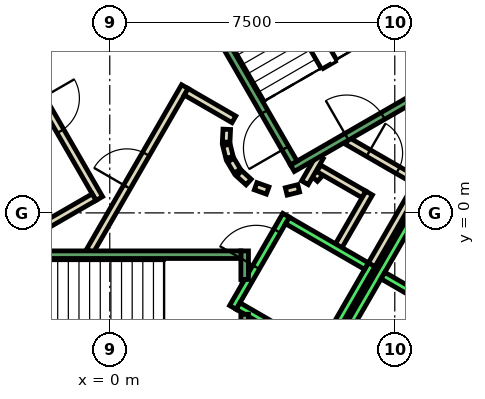
"""IFC4 building model, lengths in metres.
Left out: names, types, materials, properties, quantities, classifications, styles, units other than length and angle.
Written with IfcOpenShell. Run it as: python <this file> out.ifc"""

import sys

from ifc_helpers import new_model, si_unit, direction, frame, frame_2d, origin, place, context, subcontext, project, spatial, rectangle, extrude, element, fill, save


model = new_model("IFC4")
c1 = context("Model", 3, precision=1e-05, world=origin(), true_north=direction((0.0, 1.0)))
c2 = subcontext(c1, "Body", "Model", "MODEL_VIEW")
j1 = project(units=[si_unit("LENGTHUNIT", "METRE"), si_unit("PLANEANGLEUNIT", "RADIAN")], contexts=[c1])
p1 = place(None, origin())
s1 = spatial("IfcSite", under=j1, at=p1, CompositionType="ELEMENT")
p2 = place(p1, origin())
s2 = spatial("IfcBuilding", under=s1, at=p2, CompositionType="ELEMENT")
p3 = place(p2, frame((0.0, 0.0, 171.8)))
s3 = spatial("IfcBuildingStorey", under=s2, at=p3, CompositionType="ELEMENT", Elevation=171.8)
p4 = place(p3, frame((5.39, 0.898, 0.0), z_axis=(0.0, 0.0, 1.0), x_axis=(0.673828488714, 0.738887791073, 0.0)))
e1 = element("IfcWall", 1, at=p4, inside=s3, PredefinedType="PARTITIONING", context=c2, shape_type="SweptSolid", body=[
    extrude(rectangle(XDim=0.263, YDim=0.2, at=frame_2d((0.131, 0.0))), origin(), (0.0, 0.0, 1.0), 3.8),
])
p5 = place(p3, frame((5.499, 1.172, 0.0), z_axis=(0.0, 0.0, 1.0), x_axis=(0.866333505267, -0.499465972466, 0.0)))
e2 = element("IfcWall", 2, at=p5, inside=s3, PredefinedType="PARTITIONING", context=c2, shape_type="SweptSolid", body=[
    extrude(rectangle(XDim=1.374, YDim=0.2, at=frame_2d((0.687, 0.0))), origin(), (0.0, 0.0, 1.0), 3.8),
])
p6 = place(p3, frame((6.826, 0.522, 0.0), z_axis=(0.0, 0.0, 1.0), x_axis=(-0.500016722714, -0.866015748706, 0.0)))
e3 = element("IfcWall", 3, at=p6, inside=s3, PredefinedType="PARTITIONING", context=c2, shape_type="SweptSolid", body=[
    extrude(rectangle(XDim=1.7, YDim=0.2, at=frame_2d((0.85, 0.0))), origin(), (0.0, 0.0, 1.0), 3.8),
])
p7 = place(p3, frame((6.25, 1.894, 0.0), z_axis=(0.0, 0.0, 1.0), x_axis=(0.866043184279, -0.499969202016, 0.0)))
e4 = element("IfcWall", 4, at=p7, inside=s3, PredefinedType="PARTITIONING", context=c2, shape_type="SweptSolid", body=[
    extrude(rectangle(XDim=2.084, YDim=0.2, at=frame_2d((1.042, 0.0))), origin(), (0.0, 0.0, 1.0), 3.8),
])
p8 = place(p7, frame((0.642, 0.0, 0.0)))
e5 = element("IfcOpeningElement", 5, at=p8, cuts=e4, PredefinedType="OPENING", context=c2, shape_type="SweptSolid", body=[
    extrude(rectangle(XDim=0.9, YDim=2.1, at=frame_2d((0.45, 1.05))), frame((0.0, 0.11, 0.0), z_axis=(0.0, -1.0, 0.0), x_axis=(1.0, 0.0, 0.0)), (0.0, 0.0, 1.0), 0.22),
])
p9 = place(p3, frame((8.192, 0.888, 0.0), z_axis=(0.0, 0.0, 1.0), x_axis=(-0.499940625693, -0.866059680843, 0.0)))
e6 = element("IfcWall", 6, at=p9, inside=s3, PredefinedType="PARTITIONING", context=c2, shape_type="SweptSolid", body=[
    extrude(rectangle(XDim=2.68, YDim=0.2, at=frame_2d((1.34, 0.0))), origin(), (0.0, 0.0, 1.0), 3.8),
])
p10 = place(p3, frame((5.135, 0.793, 0.0), z_axis=(0.0, 0.0, 1.0), x_axis=(0.499526442893, 0.866298639529, 0.0)))
e7 = element("IfcWall", 7, at=p10, inside=s3, PredefinedType="PARTITIONING", context=c2, shape_type="SweptSolid", body=[
    extrude(rectangle(XDim=0.791, YDim=0.2, at=frame_2d((0.396, 0.0))), origin(), (0.0, 0.0, 1.0), 3.8),
])
p11 = place(p3, frame((-0.52, -1.0, 0.0), z_axis=(0.0, 0.0, 1.0), x_axis=(0.50011622646, 0.865958290007, 0.0)))
e8 = element("IfcWall", 8, at=p11, inside=s3, PredefinedType="PARTITIONING", context=c2, shape_type="SweptSolid", body=[
    extrude(rectangle(XDim=4.991, YDim=0.2, at=frame_2d((2.496, 0.0))), origin(), (0.0, 0.0, 1.0), 3.8),
])
p12 = place(p11, frame((1.945, 0.0, 0.0)))
e9 = element("IfcOpeningElement", 9, at=p12, cuts=e8, PredefinedType="OPENING", context=c2, shape_type="SweptSolid", body=[
    extrude(rectangle(XDim=1.0, YDim=2.1, at=frame_2d((0.5, 1.05))), frame((0.0, 0.11, 0.0), z_axis=(0.0, -1.0, 0.0), x_axis=(1.0, 0.0, 0.0)), (0.0, 0.0, 1.0), 0.22),
])
p13 = place(p3, frame((2.012, 3.186, 0.0), z_axis=(0.0, 0.0, 1.0), x_axis=(0.865891012941, -0.500232699559, 0.0)))
e10 = element("IfcWall", 10, at=p13, inside=s3, PredefinedType="PARTITIONING", context=c2, shape_type="SweptSolid", body=[
    extrude(rectangle(XDim=1.449, YDim=0.2, at=frame_2d((0.725, 0.0))), origin(), (0.0, 0.0, 1.0), 3.8),
])
p14 = place(p3, frame((3.079, 2.199, 0.0), z_axis=(0.0, 0.0, 1.0), x_axis=(-0.047771483479, -0.998858290933, 0.0)))
e11 = element("IfcWall", 11, at=p14, inside=s3, PredefinedType="PARTITIONING", context=c2, shape_type="SweptSolid", body=[
    extrude(rectangle(XDim=0.337, YDim=0.2, at=frame_2d((0.169, 0.0))), origin(), (0.0, 0.0, 1.0), 3.8),
])
p15 = place(p3, frame((3.07, 1.786, 0.0), z_axis=(0.0, 0.0, 1.0), x_axis=(0.242705583207, -0.970099994784, 0.0)))
e12 = element("IfcWall", 12, at=p15, inside=s3, PredefinedType="PARTITIONING", context=c2, shape_type="SweptSolid", body=[
    extrude(rectangle(XDim=0.338, YDim=0.2, at=frame_2d((0.169, 0.0))), origin(), (0.0, 0.0, 1.0), 3.8),
])
for number, where, z_axis, x_axis in (
    (13, (3.182, 1.388, 0.0), (0.0, 0.0, 1.0), (0.512, -0.859, 0.0)),
    (14, (3.404, 1.039, 0.0), (0.0, 0.0, 1.0), (0.74, -0.672, 0.0)),
):
    element("IfcWall", number, at=place(p3, frame(where, z_axis=z_axis, x_axis=x_axis)), inside=s3, PredefinedType="PARTITIONING", context=c2, shape_type="SweptSolid", body=[
        extrude(rectangle(XDim=0.338, YDim=0.2, at=frame_2d((0.169, 0.0))), origin(), (0.0, 0.0, 1.0), 3.8),
    ])
p16 = place(p3, frame((3.838, 0.702, 0.0), z_axis=(0.0, 0.0, 1.0), x_axis=(0.941035081519, -0.338308993895, 0.0)))
e15 = element("IfcWall", 15, at=p16, inside=s3, PredefinedType="PARTITIONING", context=c2, shape_type="SweptSolid", body=[
    extrude(rectangle(XDim=0.337, YDim=0.2, at=frame_2d((0.168, 0.0))), origin(), (0.0, 0.0, 1.0), 3.8),
])
p17 = place(p3, frame((4.644, 0.564, 0.0), z_axis=(0.0, 0.0, 1.0), x_axis=(0.969929076366, 0.243387729394, 0.0)))
e16 = element("IfcWall", 16, at=p17, inside=s3, PredefinedType="PARTITIONING", context=c2, shape_type="SweptSolid", body=[
    extrude(rectangle(XDim=0.337, YDim=0.2, at=frame_2d((0.168, 0.0))), origin(), (0.0, 0.0, 1.0), 3.8),
])
p18 = place(p3, frame((-2.771, 4.7, 0.0), z_axis=(0.0, 0.0, 1.0), x_axis=(0.499969479948, -0.866043023828, 0.0)))
e17 = element("IfcWall", 17, at=p18, inside=s3, PredefinedType="PARTITIONING", context=c2, shape_type="SweptSolid", body=[
    extrude(rectangle(XDim=4.99, YDim=0.2, at=frame_2d((2.495, 0.0))), origin(), (0.0, 0.0, 1.0), 3.8),
])
p19 = place(p18, frame((1.945, 0.0, 0.0)))
e18 = element("IfcOpeningElement", 18, at=p19, cuts=e17, PredefinedType="OPENING", context=c2, shape_type="SweptSolid", body=[
    extrude(rectangle(XDim=1.0, YDim=2.1, at=frame_2d((0.5, 1.05))), frame((0.0, 0.11, 0.0), z_axis=(0.0, -1.0, 0.0), x_axis=(1.0, 0.0, 0.0)), (0.0, 0.0, 1.0), 0.22),
])
p20 = place(p3, frame((-0.412, 0.414, 0.0), z_axis=(0.0, 0.0, 1.0), x_axis=(-0.866017369001, -0.500013916395, 0.0)))
e19 = element("IfcWall", 19, at=p20, inside=s3, PredefinedType="PARTITIONING", context=c2, shape_type="SweptSolid", body=[
    extrude(rectangle(XDim=1.45, YDim=0.2, at=frame_2d((0.725, 0.0))), origin(), (0.0, 0.0, 1.0), 3.8),
])
p21 = place(p3, frame((3.24, -2.488, 0.0), z_axis=(0.0, 0.0, 1.0), x_axis=(0.49994636267, 0.866056369097, 0.0)))
e20 = element("IfcWall", 20, at=p21, inside=s3, PredefinedType="STANDARD", context=c2, shape_type="SweptSolid", body=[
    extrude(rectangle(XDim=2.8, YDim=0.2, at=frame_2d((1.4, 0.0))), origin(), (0.0, 0.0, 1.0), 3.8),
])
p22 = place(p21, frame((1.225, 0.0, 0.0)))
e21 = element("IfcOpeningElement", 21, at=p22, cuts=e20, PredefinedType="OPENING", context=c2, shape_type="SweptSolid", body=[
    extrude(rectangle(XDim=1.1, YDim=2.1, at=frame_2d((0.55, 1.05))), frame((0.0, 0.11, 0.0), z_axis=(0.0, -1.0, 0.0), x_axis=(1.0, 0.0, 0.0)), (0.0, 0.0, 1.0), 0.22),
])
p23 = place(p3, frame((5.492, -3.788, 0.0), z_axis=(0.0, 0.0, 1.0), x_axis=(0.500011755427, 0.866018616679, 0.0)))
e22 = element("IfcWall", 22, at=p23, inside=s3, PredefinedType="STANDARD", context=c2, shape_type="SweptSolid", body=[
    extrude(rectangle(XDim=2.8, YDim=0.2, at=frame_2d((1.4, 0.0))), origin(), (0.0, 0.0, 1.0), 3.8),
])
p24 = place(p3, frame((3.377, -2.452, 0.0), z_axis=(0.0, 0.0, 1.0), x_axis=(0.865955154139, -0.50012165622, 0.0)))
e23 = element("IfcWall", 23, at=p24, inside=s3, PredefinedType="STANDARD", context=c2, shape_type="SweptSolid", body=[
    extrude(rectangle(XDim=2.4, YDim=0.2, at=frame_2d((1.2, 0.0))), origin(), (0.0, 0.0, 1.0), 3.8),
])
p25 = place(p3, frame((4.677, -0.2, 0.0), z_axis=(0.0, 0.0, 1.0), x_axis=(0.865973769406, -0.500089422704, 0.0)))
e24 = element("IfcWall", 24, at=p25, inside=s3, PredefinedType="STANDARD", context=c2, shape_type="SweptSolid", body=[
    extrude(rectangle(XDim=2.399, YDim=0.2, at=frame_2d((1.2, 0.0))), origin(), (0.0, 0.0, 1.0), 3.8),
])
p26 = place(p3, frame((4.451, -6.19, 0.0), z_axis=(0.0, 0.0, 1.0), x_axis=(0.50000090737, 0.866024879913, 0.0)))
e25 = element("IfcWall", 25, at=p26, inside=s3, PredefinedType="STANDARD", context=c2, shape_type="SweptSolid", body=[
    extrude(rectangle(XDim=10.6, YDim=0.2, at=frame_2d((5.3, 0.0))), origin(), (0.0, 0.0, 1.0), 3.8),
])
p27 = place(p3, frame((7.188, -1.65, 0.0), z_axis=(0.0, 0.0, 1.0), x_axis=(0.866022959057, -0.500004234368, 0.0)))
e26 = element("IfcWall", 26, at=p27, inside=s3, PredefinedType="STANDARD", context=c2, shape_type="SweptSolid", body=[
    extrude(rectangle(XDim=2.5, YDim=0.2, at=frame_2d((1.25, 0.0))), origin(), (0.0, 0.0, 1.0), 3.8),
])
p28 = place(p3, frame((3.55, -2.667, 0.0), z_axis=(0.0, 0.0, 1.0), x_axis=(0.0, -1.0, 0.0)))
e27 = element("IfcWall", 27, at=p28, inside=s3, PredefinedType="STANDARD", context=c2, shape_type="SweptSolid", body=[
    extrude(rectangle(XDim=2.733, YDim=0.2, at=frame_2d((1.366, 0.0))), origin(), (0.0, 0.0, 1.0), 3.8),
])
p29 = place(p3, frame((3.55, -1.0, 0.0), z_axis=(0.0, 0.0, 1.0), x_axis=(0.0, -1.0, 0.0)))
e28 = element("IfcWall", 28, at=p29, inside=s3, PredefinedType="STANDARD", context=c2, shape_type="SweptSolid", body=[
    extrude(rectangle(XDim=0.751, YDim=0.2, at=frame_2d((0.375, 0.0))), origin(), (0.0, 0.0, 1.0), 3.8),
])
p30 = place(p3, frame((-3.45, -1.1, 0.0), z_axis=(0.0, 0.0, 1.0), x_axis=(1.0, 0.0, 0.0)))
e29 = element("IfcWall", 29, at=p30, inside=s3, PredefinedType="STANDARD", context=c2, shape_type="SweptSolid", body=[
    extrude(rectangle(XDim=6.9, YDim=0.2, at=frame_2d((3.45, 0.0))), origin(), (0.0, 0.0, 1.0), 3.8),
])
p31 = place(p30, frame((0.45, 0.0, 0.0)))
e30 = element("IfcOpeningElement", 30, at=p31, cuts=e29, PredefinedType="OPENING", context=c2, shape_type="SweptSolid", body=[
    extrude(rectangle(XDim=1.1, YDim=2.2, at=frame_2d((0.55, 1.1))), frame((0.0, 0.11, 0.0), z_axis=(0.0, -1.0, 0.0), x_axis=(1.0, 0.0, 0.0)), (0.0, 0.0, 1.0), 0.22),
])
p32 = place(p3, frame((4.806, 1.176, 0.0), z_axis=(0.0, 0.0, 1.0), x_axis=(0.866059941101, 0.499940174841, 0.0)))
e31 = element("IfcWall", 31, at=p32, inside=s3, PredefinedType="STANDARD", context=c2, shape_type="SweptSolid", body=[
    extrude(rectangle(XDim=4.4, YDim=0.2, at=frame_2d((2.2, 0.0))), origin(), (0.0, 0.0, 1.0), 3.8),
])
p33 = place(p32, frame((1.65, 0.0, 0.0)))
e32 = element("IfcOpeningElement", 32, at=p33, cuts=e31, PredefinedType="OPENING", context=c2, shape_type="SweptSolid", body=[
    extrude(rectangle(XDim=1.1, YDim=2.2, at=frame_2d((0.55, 1.1))), frame((0.0, 0.11, 0.0), z_axis=(0.0, -1.0, 0.0), x_axis=(1.0, 0.0, 0.0)), (0.0, 0.0, 1.0), 0.22),
])
p34 = place(p3, frame((4.843, 1.312, 0.0), z_axis=(0.0, 0.0, 1.0), x_axis=(-0.499963383562, 0.866046543262, 0.0)))
e33 = element("IfcWall", 33, at=p34, inside=s3, PredefinedType="STANDARD", context=c2, shape_type="SweptSolid", body=[
    extrude(rectangle(XDim=6.9, YDim=0.2, at=frame_2d((3.45, 0.0))), origin(), (0.0, 0.0, 1.0), 3.8),
])
p35 = place(p34, frame((0.45, 0.0, 0.0)))
e34 = element("IfcOpeningElement", 34, at=p35, cuts=e33, PredefinedType="OPENING", context=c2, shape_type="SweptSolid", body=[
    extrude(rectangle(XDim=1.1, YDim=2.2, at=frame_2d((0.55, 1.1))), frame((0.0, 0.11, 0.0), z_axis=(0.0, -1.0, 0.0), x_axis=(1.0, 0.0, 0.0)), (0.0, 0.0, 1.0), 0.22),
])
p36 = place(p3, frame((8.48, 3.412, 0.0), z_axis=(0.0, 0.0, 1.0), x_axis=(-0.499978703459, 0.866037698999, 0.0)))
e35 = element("IfcWall", 35, at=p36, inside=s3, PredefinedType="STANDARD", context=c2, shape_type="SweptSolid", body=[
    extrude(rectangle(XDim=6.9, YDim=0.2, at=frame_2d((3.45, 0.0))), origin(), (0.0, 0.0, 1.0), 3.8),
])
p37 = place(p3, frame((-1.393, 7.288, 0.0), z_axis=(0.0, 0.0, 1.0), x_axis=(-0.499963383562, -0.866046543262, 0.0)))
e36 = element("IfcWall", 36, at=p37, inside=s3, PredefinedType="STANDARD", context=c2, shape_type="SweptSolid", body=[
    extrude(rectangle(XDim=6.9, YDim=0.2, at=frame_2d((3.45, 0.0))), origin(), (0.0, 0.0, 1.0), 3.8),
])
p38 = place(p37, frame((0.45, 0.0, 0.0)))
e37 = element("IfcOpeningElement", 37, at=p38, cuts=e36, PredefinedType="OPENING", context=c2, shape_type="SweptSolid", body=[
    extrude(rectangle(XDim=1.1, YDim=2.2, at=frame_2d((0.55, 1.1))), frame((0.0, 0.11, 0.0), z_axis=(0.0, -1.0, 0.0), x_axis=(1.0, 0.0, 0.0)), (0.0, 0.0, 1.0), 0.22),
])
p39 = place(p12, origin())
e38 = element("IfcDoor", 38, at=p39, inside=s3, OperationType="SINGLE_SWING_LEFT", PredefinedType="DOOR", context=c2, shape_type="SweptSolid", body=[
    extrude(rectangle(XDim=1.0, YDim=2.1, at=frame_2d((0.5, 1.05))), frame((0.0, 0.025, 0.0), z_axis=(0.0, -1.0, 0.0), x_axis=(1.0, 0.0, 0.0)), (0.0, 0.0, 1.0), 0.05),
])
fill(e9, e38)
p40 = place(p19, origin())
e39 = element("IfcDoor", 39, at=p40, inside=s3, OperationType="SINGLE_SWING_RIGHT", PredefinedType="DOOR", context=c2, shape_type="SweptSolid", body=[
    extrude(rectangle(XDim=1.0, YDim=2.1, at=frame_2d((0.5, 1.05))), frame((0.0, 0.025, 0.0), z_axis=(0.0, -1.0, 0.0), x_axis=(1.0, 0.0, 0.0)), (0.0, 0.0, 1.0), 0.05),
])
fill(e18, e39)
p41 = place(p8, origin())
e40 = element("IfcDoor", 40, at=p41, inside=s3, OperationType="SINGLE_SWING_LEFT", PredefinedType="DOOR", context=c2, shape_type="SweptSolid", body=[
    extrude(rectangle(XDim=0.9, YDim=2.1, at=frame_2d((0.45, 1.05))), frame((0.0, 0.025, 0.0), z_axis=(0.0, -1.0, 0.0), x_axis=(1.0, 0.0, 0.0)), (0.0, 0.0, 1.0), 0.05),
])
fill(e5, e40)
p42 = place(p22, origin())
e41 = element("IfcDoor", 41, at=p42, inside=s3, OperationType="SLIDING_TO_LEFT", PredefinedType="DOOR", context=c2, shape_type="SweptSolid", body=[
    extrude(rectangle(XDim=1.1, YDim=2.1, at=frame_2d((0.55, 1.05))), frame((0.0, 0.025, 0.0), z_axis=(0.0, -1.0, 0.0), x_axis=(1.0, 0.0, 0.0)), (0.0, 0.0, 1.0), 0.05),
])
fill(e21, e41)
p43 = place(p35, origin())
e42 = element("IfcDoor", 42, at=p43, inside=s3, OperationType="SINGLE_SWING_LEFT", PredefinedType="DOOR", context=c2, shape_type="SweptSolid", body=[
    extrude(rectangle(XDim=1.1, YDim=2.2, at=frame_2d((0.55, 1.1))), frame((0.0, 0.025, 0.0), z_axis=(0.0, -1.0, 0.0), x_axis=(1.0, 0.0, 0.0)), (0.0, 0.0, 1.0), 0.05),
])
fill(e34, e42)
p44 = place(p33, origin())
e43 = element("IfcDoor", 43, at=p44, inside=s3, OperationType="SINGLE_SWING_LEFT", PredefinedType="DOOR", context=c2, shape_type="SweptSolid", body=[
    extrude(rectangle(XDim=1.1, YDim=2.2, at=frame_2d((0.55, 1.1))), frame((0.0, 0.025, 0.0), z_axis=(0.0, -1.0, 0.0), x_axis=(1.0, 0.0, 0.0)), (0.0, 0.0, 1.0), 0.05),
])
fill(e32, e43)
save(model, sys.argv[1])
